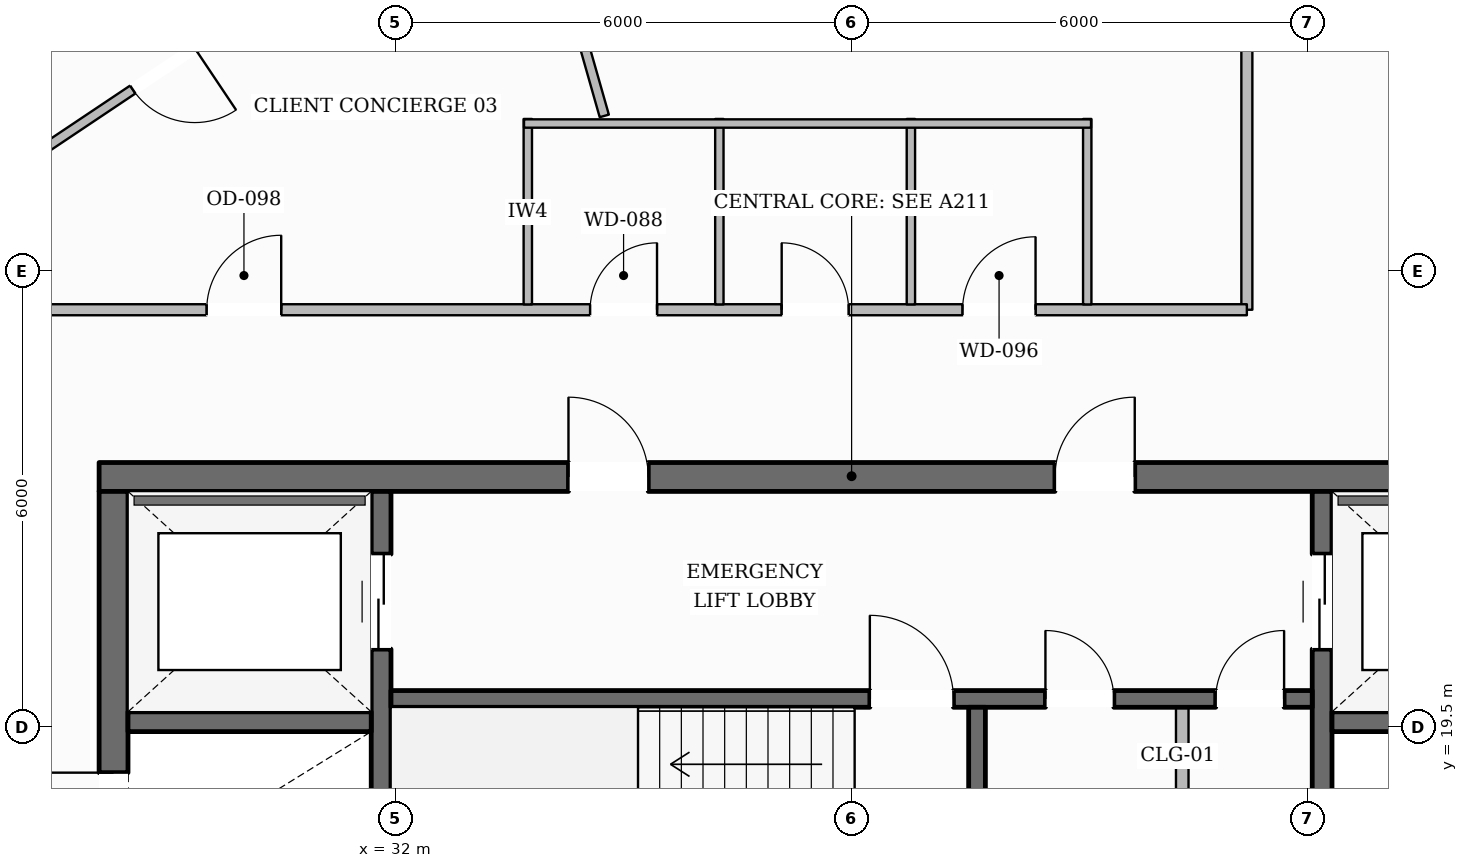
"""IFC4 building model, lengths in metres.
Left out: names, types, materials, properties, quantities, classifications, styles, units other than length and angle.
Written with IfcOpenShell. Run it as: python <this file> out.ifc"""

import sys

from ifc_helpers import new_model, si_unit, direction, frame, frame_2d, origin, place, context, subcontext, project, spatial, rectangle, extrude, element, fill, save


model = new_model("IFC4")
c1 = context("Model", 3, precision=1e-05, world=origin(), true_north=direction((0.0, 1.0)))
c2 = subcontext(c1, "Body", "Model", "MODEL_VIEW")
j1 = project(units=[si_unit("LENGTHUNIT", "METRE"), si_unit("PLANEANGLEUNIT", "RADIAN")], contexts=[c1])
p1 = place(None, origin())
s1 = spatial("IfcSite", under=j1, at=p1, CompositionType="ELEMENT")
p2 = place(p1, origin())
s2 = spatial("IfcBuilding", under=s1, at=p2, CompositionType="ELEMENT")
p3 = place(p2, frame((0.0, 0.0, 262.6)))
s3 = spatial("IfcBuildingStorey", under=s2, at=p3, CompositionType="ELEMENT", Elevation=262.6)
p4 = place(p3, frame((28.1, 22.79, 0.0), z_axis=(0.0, 0.0, 1.0), x_axis=(1.0, 0.0, 0.0)))
e1 = element("IfcWall", 1, at=p4, inside=s3, PredefinedType="SOLIDWALL", context=c2, shape_type="SweptSolid", body=[
    extrude(rectangle(XDim=19.8, YDim=0.38, at=frame_2d((9.9, 0.0))), origin(), (0.0, 0.0, 1.0), 3.61),
])
p5 = place(p4, frame((6.175, 0.0, 0.0)))
e2 = element("IfcOpeningElement", 2, at=p5, cuts=e1, PredefinedType="OPENING", context=c2, shape_type="SweptSolid", body=[
    extrude(rectangle(XDim=1.05, YDim=2.15, at=frame_2d((0.525, 1.075))), frame((0.0, 0.2, 0.0), z_axis=(0.0, -1.0, 0.0), x_axis=(1.0, 0.0, 0.0)), (0.0, 0.0, 1.0), 0.4),
])
p6 = place(p4, frame((12.575, 0.0, 0.0)))
e3 = element("IfcOpeningElement", 3, at=p6, cuts=e1, PredefinedType="OPENING", context=c2, shape_type="SweptSolid", body=[
    extrude(rectangle(XDim=1.05, YDim=2.15, at=frame_2d((0.525, 1.075))), frame((0.0, 0.2, 0.0), z_axis=(0.0, -1.0, 0.0), x_axis=(1.0, 0.0, 0.0)), (0.0, 0.0, 1.0), 0.4),
])
p7 = place(p3, frame((28.29, 9.6, 0.0), z_axis=(0.0, 0.0, 1.0), x_axis=(0.0, 1.0, 0.0)))
e4 = element("IfcWall", 4, at=p7, inside=s3, PredefinedType="SOLIDWALL", context=c2, shape_type="SweptSolid", body=[
    extrude(rectangle(XDim=13.0, YDim=0.38, at=frame_2d((6.5, 0.0))), origin(), (0.0, 0.0, 1.0), 3.61),
])
p8 = place(p7, frame((0.2, 0.0, 0.0)))
e5 = element("IfcOpeningElement", 5, at=p8, cuts=e4, PredefinedType="OPENING", context=c2, shape_type="SweptSolid", body=[
    extrude(rectangle(XDim=1.1, YDim=2.15, at=frame_2d((0.55, 1.075))), frame((0.0, 0.2, 0.0), z_axis=(0.0, -1.0, 0.0), x_axis=(1.0, 0.0, 0.0)), (0.0, 0.0, 1.0), 0.4),
])
p9 = place(p7, frame((8.4, 0.0, 0.0)))
e6 = element("IfcOpeningElement", 6, at=p9, cuts=e4, PredefinedType="OPENING", context=c2, shape_type="SweptSolid", body=[
    extrude(rectangle(XDim=0.9, YDim=2.1, at=frame_2d((0.45, 1.05))), frame((0.0, 0.2, 0.0), z_axis=(0.0, -1.0, 0.0), x_axis=(1.0, 0.0, 0.0)), (0.0, 0.0, 1.0), 0.4),
])
p10 = place(p3, frame((31.81, 9.6, 0.0), z_axis=(0.0, 0.0, 1.0), x_axis=(0.0, 1.0, 0.0)))
e7 = element("IfcWall", 7, at=p10, inside=s3, PredefinedType="SHEAR", context=c2, shape_type="SweptSolid", body=[
    extrude(rectangle(XDim=13.0, YDim=0.26, at=frame_2d((6.5, 0.0))), origin(), (0.0, 0.0, 1.0), 3.61),
])
p11 = place(p10, frame((10.925, 0.0, 0.0)))
e8 = element("IfcOpeningElement", 8, at=p11, cuts=e7, PredefinedType="OPENING", context=c2, shape_type="SweptSolid", body=[
    extrude(rectangle(XDim=1.25, YDim=2.25, at=frame_2d((0.625, 1.125))), frame((0.0, 0.14, 0.0), z_axis=(0.0, -1.0, 0.0), x_axis=(1.0, 0.0, 0.0)), (0.0, 0.0, 1.0), 0.28),
])
p12 = place(p3, frame((44.19, 9.6, 0.0), z_axis=(0.0, 0.0, 1.0), x_axis=(0.0, 1.0, 0.0)))
e9 = element("IfcWall", 9, at=p12, inside=s3, PredefinedType="SHEAR", context=c2, shape_type="SweptSolid", body=[
    extrude(rectangle(XDim=13.0, YDim=0.26, at=frame_2d((6.5, 0.0))), origin(), (0.0, 0.0, 1.0), 3.61),
])
p13 = place(p12, frame((10.925, 0.0, 0.0)))
e10 = element("IfcOpeningElement", 10, at=p13, cuts=e9, PredefinedType="OPENING", context=c2, shape_type="SweptSolid", body=[
    extrude(rectangle(XDim=1.25, YDim=2.25, at=frame_2d((0.625, 1.125))), frame((0.0, 0.14, 0.0), z_axis=(0.0, -1.0, 0.0), x_axis=(1.0, 0.0, 0.0)), (0.0, 0.0, 1.0), 0.28),
])
for number, where, z_axis, x_axis in (
    (11, (28.48, 19.57, 0.0), (0.0, 0.0, 1.0), (1.0, 0.0, 0.0)),
    (12, (44.32, 19.57, 0.0), (0.0, 0.0, 1.0), (1.0, 0.0, 0.0)),
):
    element("IfcWall", number, at=place(p3, frame(where, z_axis=z_axis, x_axis=x_axis)), inside=s3, PredefinedType="SHEAR", context=c2, shape_type="SweptSolid", body=[
        extrude(rectangle(XDim=3.2, YDim=0.26, at=frame_2d((1.6, 0.0))), origin(), (0.0, 0.0, 1.0), 3.61),
    ])
p14 = place(p3, frame((31.94, 19.87, 0.0), z_axis=(0.0, 0.0, 1.0), x_axis=(1.0, 0.0, 0.0)))
e13 = element("IfcWall", 13, at=p14, inside=s3, PredefinedType="SOLIDWALL", context=c2, shape_type="SweptSolid", body=[
    extrude(rectangle(XDim=12.12, YDim=0.22, at=frame_2d((6.06, 0.0))), origin(), (0.0, 0.0, 1.0), 3.61),
])
p15 = place(p14, frame((6.3, 0.0, 0.0)))
e14 = element("IfcOpeningElement", 14, at=p15, cuts=e13, PredefinedType="OPENING", context=c2, shape_type="SweptSolid", body=[
    extrude(rectangle(XDim=1.1, YDim=2.15, at=frame_2d((0.55, 1.075))), frame((0.0, 0.12, 0.0), z_axis=(0.0, -1.0, 0.0), x_axis=(1.0, 0.0, 0.0)), (0.0, 0.0, 1.0), 0.24),
])
p16 = place(p14, frame((8.61, 0.0, 0.0)))
e15 = element("IfcOpeningElement", 15, at=p16, cuts=e13, PredefinedType="OPENING", context=c2, shape_type="SweptSolid", body=[
    extrude(rectangle(XDim=0.9, YDim=2.1, at=frame_2d((0.45, 1.05))), frame((0.0, 0.12, 0.0), z_axis=(0.0, -1.0, 0.0), x_axis=(1.0, 0.0, 0.0)), (0.0, 0.0, 1.0), 0.24),
])
p17 = place(p14, frame((10.85, 0.0, 0.0)))
e16 = element("IfcOpeningElement", 16, at=p17, cuts=e13, PredefinedType="OPENING", context=c2, shape_type="SweptSolid", body=[
    extrude(rectangle(XDim=0.9, YDim=2.1, at=frame_2d((0.45, 1.05))), frame((0.0, 0.12, 0.0), z_axis=(0.0, -1.0, 0.0), x_axis=(1.0, 0.0, 0.0)), (0.0, 0.0, 1.0), 0.24),
])
p18 = place(p3, frame((39.65, 16.56, 0.0), z_axis=(0.0, 0.0, 1.0), x_axis=(0.0, 1.0, 0.0)))
e17 = element("IfcWall", 17, at=p18, inside=s3, PredefinedType="SOLIDWALL", context=c2, shape_type="SweptSolid", body=[
    extrude(rectangle(XDim=3.2, YDim=0.22, at=frame_2d((1.6, 0.0))), origin(), (0.0, 0.0, 1.0), 3.61),
])
p19 = place(p3, frame((16.079, 10.951, 0.0), z_axis=(0.0, 0.0, 1.0), x_axis=(0.498709777088, 0.866769033963, 0.0)))
e18 = element("IfcWall", 18, at=p19, inside=s3, PredefinedType="STANDARD", context=c2, shape_type="SweptSolid", body=[
    extrude(rectangle(XDim=37.726, YDim=0.35, at=frame_2d((18.863, 0.0))), origin(), (0.0, 0.0, 1.0), 3.196),
])
p20 = place(p19, frame((9.031, 0.0, 0.0)))
e19 = element("IfcOpeningElement", 19, at=p20, cuts=e18, PredefinedType="OPENING", context=c2, shape_type="SweptSolid", body=[
    extrude(rectangle(XDim=1.0, YDim=2.2, at=frame_2d((0.5, 1.1))), frame((0.0, 0.185, 0.0), z_axis=(0.0, -1.0, 0.0), x_axis=(1.0, 0.0, 0.0)), (0.0, 0.0, 1.0), 0.37),
])
p21 = place(p19, frame((33.506, 0.0, 0.65)))
e20 = element("IfcOpeningElement", 20, at=p21, cuts=e18, PredefinedType="OPENING", context=c2, shape_type="SweptSolid", body=[
    extrude(rectangle(XDim=1.35, YDim=1.75, at=frame_2d((0.675, 0.875))), frame((0.0, 0.185, 0.0), z_axis=(0.0, -1.0, 0.0), x_axis=(1.0, 0.0, 0.0)), (0.0, 0.0, 1.0), 0.37),
])
p22 = place(p19, frame((27.379, 0.0, 0.65)))
e21 = element("IfcOpeningElement", 21, at=p22, cuts=e18, PredefinedType="OPENING", context=c2, shape_type="SweptSolid", body=[
    extrude(rectangle(XDim=1.35, YDim=1.75, at=frame_2d((0.675, 0.875))), frame((0.0, 0.185, 0.0), z_axis=(0.0, -1.0, 0.0), x_axis=(1.0, 0.0, 0.0)), (0.0, 0.0, 1.0), 0.37),
])
p23 = place(p19, frame((21.251, 0.0, 0.65)))
e22 = element("IfcOpeningElement", 22, at=p23, cuts=e18, PredefinedType="OPENING", context=c2, shape_type="SweptSolid", body=[
    extrude(rectangle(XDim=1.35, YDim=1.75, at=frame_2d((0.675, 0.875))), frame((0.0, 0.185, 0.0), z_axis=(0.0, -1.0, 0.0), x_axis=(1.0, 0.0, 0.0)), (0.0, 0.0, 1.0), 0.37),
])
p24 = place(p19, frame((2.868, 0.0, 0.65)))
e23 = element("IfcOpeningElement", 23, at=p24, cuts=e18, PredefinedType="OPENING", context=c2, shape_type="SweptSolid", body=[
    extrude(rectangle(XDim=1.35, YDim=1.75, at=frame_2d((0.675, 0.875))), frame((0.0, 0.185, 0.0), z_axis=(0.0, -1.0, 0.0), x_axis=(1.0, 0.0, 0.0)), (0.0, 0.0, 1.0), 0.37),
])
p25 = place(p3, frame((41.23, 43.577, 0.0), z_axis=(0.0, 0.0, 1.0), x_axis=(0.507689696002, -0.861540000565, 0.0)))
e24 = element("IfcWall", 24, at=p25, inside=s3, PredefinedType="STANDARD", context=c2, shape_type="SweptSolid", body=[
    extrude(rectangle(XDim=38.41, YDim=0.35, at=frame_2d((19.205, 0.0))), origin(), (0.0, 0.0, 1.0), 3.196),
])
p26 = place(p25, frame((34.134, 0.0, 0.65)))
e25 = element("IfcOpeningElement", 25, at=p26, cuts=e24, PredefinedType="OPENING", context=c2, shape_type="SweptSolid", body=[
    extrude(rectangle(XDim=1.35, YDim=1.75, at=frame_2d((0.675, 0.875))), frame((0.0, 0.185, 0.0), z_axis=(0.0, -1.0, 0.0), x_axis=(1.0, 0.0, 0.0)), (0.0, 0.0, 1.0), 0.37),
])
p27 = place(p25, frame((27.89, 0.0, 0.65)))
e26 = element("IfcOpeningElement", 26, at=p27, cuts=e24, PredefinedType="OPENING", context=c2, shape_type="SweptSolid", body=[
    extrude(rectangle(XDim=1.35, YDim=1.75, at=frame_2d((0.675, 0.875))), frame((0.0, 0.185, 0.0), z_axis=(0.0, -1.0, 0.0), x_axis=(1.0, 0.0, 0.0)), (0.0, 0.0, 1.0), 0.37),
])
p28 = place(p25, frame((21.647, 0.0, 0.65)))
e27 = element("IfcOpeningElement", 27, at=p28, cuts=e24, PredefinedType="OPENING", context=c2, shape_type="SweptSolid", body=[
    extrude(rectangle(XDim=1.35, YDim=1.75, at=frame_2d((0.675, 0.875))), frame((0.0, 0.185, 0.0), z_axis=(0.0, -1.0, 0.0), x_axis=(1.0, 0.0, 0.0)), (0.0, 0.0, 1.0), 0.37),
])
p29 = place(p25, frame((9.161, 0.0, 0.65)))
e28 = element("IfcOpeningElement", 28, at=p29, cuts=e24, PredefinedType="OPENING", context=c2, shape_type="SweptSolid", body=[
    extrude(rectangle(XDim=1.35, YDim=1.75, at=frame_2d((0.675, 0.875))), frame((0.0, 0.185, 0.0), z_axis=(0.0, -1.0, 0.0), x_axis=(1.0, 0.0, 0.0)), (0.0, 0.0, 1.0), 0.37),
])
p30 = place(p25, frame((2.917, 0.0, 0.65)))
e29 = element("IfcOpeningElement", 29, at=p30, cuts=e24, PredefinedType="OPENING", context=c2, shape_type="SweptSolid", body=[
    extrude(rectangle(XDim=1.35, YDim=1.75, at=frame_2d((0.675, 0.875))), frame((0.0, 0.185, 0.0), z_axis=(0.0, -1.0, 0.0), x_axis=(1.0, 0.0, 0.0)), (0.0, 0.0, 1.0), 0.37),
])
p31 = place(p3, frame((42.35, 16.56, 0.0), z_axis=(0.0, 0.0, 1.0), x_axis=(0.0, 1.0, 0.0)))
e30 = element("IfcWall", 30, at=p31, inside=s3, PredefinedType="PARTITIONING", context=c2, shape_type="SweptSolid", body=[
    extrude(rectangle(XDim=3.2, YDim=0.165, at=frame_2d((1.6, 0.0))), origin(), (0.0, 0.0, 1.0), 3.61),
])
p32 = place(p3, frame((43.2, 24.99, 0.0), z_axis=(0.0, 0.0, 1.0), x_axis=(0.0, 1.0, 0.0)))
e31 = element("IfcWall", 31, at=p32, inside=s3, PredefinedType="PARTITIONING", context=c2, shape_type="SweptSolid", body=[
    extrude(rectangle(XDim=9.217, YDim=0.145, at=frame_2d((4.608, 0.0))), origin(), (0.0, 0.0, 1.0), 3.61),
])
p33 = place(p32, frame((3.908, 0.0, 0.0)))
e32 = element("IfcOpeningElement", 32, at=p33, cuts=e31, PredefinedType="OPENING", context=c2, shape_type="SweptSolid", body=[
    extrude(rectangle(XDim=1.4, YDim=2.2, at=frame_2d((0.7, 1.1))), frame((0.0, 0.083, 0.0), z_axis=(0.0, -1.0, 0.0), x_axis=(1.0, 0.0, 0.0)), (0.0, 0.0, 1.0), 0.165),
])
p34 = place(p3, frame((26.09, 24.99, 0.0), z_axis=(0.0, 0.0, 1.0), x_axis=(1.0, 0.0, 0.0)))
e33 = element("IfcWall", 33, at=p34, inside=s3, PredefinedType="PARTITIONING", context=c2, shape_type="SweptSolid", body=[
    extrude(rectangle(XDim=17.11, YDim=0.145, at=frame_2d((8.555, 0.0))), origin(), (0.0, 0.0, 1.0), 3.61),
])
p35 = place(p34, frame((8.47, 0.0, 0.0)))
e34 = element("IfcOpeningElement", 34, at=p35, cuts=e33, PredefinedType="OPENING", context=c2, shape_type="SweptSolid", body=[
    extrude(rectangle(XDim=0.88, YDim=2.1, at=frame_2d((0.44, 1.05))), frame((0.0, 0.083, 0.0), z_axis=(0.0, -1.0, 0.0), x_axis=(1.0, 0.0, 0.0)), (0.0, 0.0, 1.0), 0.165),
])
p36 = place(p34, frame((10.99, 0.0, 0.0)))
e35 = element("IfcOpeningElement", 35, at=p36, cuts=e33, PredefinedType="OPENING", context=c2, shape_type="SweptSolid", body=[
    extrude(rectangle(XDim=0.88, YDim=2.1, at=frame_2d((0.44, 1.05))), frame((0.0, 0.083, 0.0), z_axis=(0.0, -1.0, 0.0), x_axis=(1.0, 0.0, 0.0)), (0.0, 0.0, 1.0), 0.165),
])
p37 = place(p34, frame((13.37, 0.0, 0.0)))
e36 = element("IfcOpeningElement", 36, at=p37, cuts=e33, PredefinedType="OPENING", context=c2, shape_type="SweptSolid", body=[
    extrude(rectangle(XDim=0.96, YDim=2.1, at=frame_2d((0.48, 1.05))), frame((0.0, 0.083, 0.0), z_axis=(0.0, -1.0, 0.0), x_axis=(1.0, 0.0, 0.0)), (0.0, 0.0, 1.0), 0.165),
])
p38 = place(p34, frame((3.426, 0.0, 0.0)))
e37 = element("IfcOpeningElement", 37, at=p38, cuts=e33, PredefinedType="OPENING", context=c2, shape_type="SweptSolid", body=[
    extrude(rectangle(XDim=0.98, YDim=2.15, at=frame_2d((0.49, 1.075))), frame((0.0, 0.083, 0.0), z_axis=(0.0, -1.0, 0.0), x_axis=(1.0, 0.0, 0.0)), (0.0, 0.0, 1.0), 0.165),
])
for number, where, z_axis, x_axis in (
    (38, (33.74, 25.06, 0.0), (0.0, 0.0, 1.0), (0.0, 1.0, 0.0)),
    (39, (36.26, 25.06, 0.0), (0.0, 0.0, 1.0), (0.0, 1.0, 0.0)),
    (40, (38.78, 25.06, 0.0), (0.0, 0.0, 1.0), (0.0, 1.0, 0.0)),
):
    element("IfcWall", number, at=place(p3, frame(where, z_axis=z_axis, x_axis=x_axis)), inside=s3, PredefinedType="PLUMBINGWALL", context=c2, shape_type="SweptSolid", body=[
        extrude(rectangle(XDim=2.44, YDim=0.11, at=frame_2d((1.22, 0.0))), origin(), (0.0, 0.0, 1.0), 3.61),
    ])
p39 = place(p3, frame((41.1, 25.06, 0.0), z_axis=(0.0, 0.0, 1.0), x_axis=(0.0, 1.0, 0.0)))
e41 = element("IfcWall", 41, at=p39, inside=s3, PredefinedType="PLUMBINGWALL", context=c2, shape_type="SweptSolid", body=[
    extrude(rectangle(XDim=2.44, YDim=0.11, at=frame_2d((1.22, 0.0))), origin(), (0.0, 0.0, 1.0), 3.246),
])
p40 = place(p3, frame((33.69, 27.44, 0.0), z_axis=(0.0, 0.0, 1.0), x_axis=(1.0, 0.0, 0.0)))
e42 = element("IfcWall", 42, at=p40, inside=s3, PredefinedType="PLUMBINGWALL", context=c2, shape_type="SweptSolid", body=[
    extrude(rectangle(XDim=7.46, YDim=0.11, at=frame_2d((3.73, 0.0))), origin(), (0.0, 0.0, 1.0), 3.61),
])
p41 = place(p3, frame((34.746, 27.54, 0.0), z_axis=(0.0, 0.0, 1.0), x_axis=(-0.273575053809, 0.961850658852, 0.0)))
e43 = element("IfcWall", 43, at=p41, inside=s3, PredefinedType="PARTITIONING", context=c2, shape_type="SweptSolid", body=[
    extrude(rectangle(XDim=10.355, YDim=0.125, at=frame_2d((5.178, 0.0))), origin(), (0.0, 0.0, 1.0), 3.61),
])
p42 = place(p3, frame((33.658, 31.31, 0.0), z_axis=(0.0, 0.0, 1.0), x_axis=(-0.831131874476, -0.556075361106, 0.0)))
e44 = element("IfcWall", 44, at=p42, inside=s3, PredefinedType="PARTITIONING", context=c2, shape_type="SweptSolid", body=[
    extrude(rectangle(XDim=11.138, YDim=0.125, at=frame_2d((5.569, 0.0))), origin(), (0.0, 0.0, 1.0), 3.199),
])
p43 = place(p42, frame((5.175, 0.0, 0.0)))
e45 = element("IfcOpeningElement", 45, at=p43, cuts=e44, PredefinedType="OPENING", context=c2, shape_type="SweptSolid", body=[
    extrude(rectangle(XDim=0.98, YDim=2.15, at=frame_2d((0.49, 1.075))), frame((0.0, 0.073, 0.0), z_axis=(0.0, -1.0, 0.0), x_axis=(1.0, 0.0, 0.0)), (0.0, 0.0, 1.0), 0.145),
])
p44 = place(p15, origin())
e46 = element("IfcDoor", 46, at=p44, inside=s3, OperationType="SINGLE_SWING_LEFT", PredefinedType="DOOR", context=c2, shape_type="SweptSolid", body=[
    extrude(rectangle(XDim=1.1, YDim=2.15, at=frame_2d((0.55, 1.075))), frame((0.0, 0.025, 0.0), z_axis=(0.0, -1.0, 0.0), x_axis=(1.0, 0.0, 0.0)), (0.0, 0.0, 1.0), 0.05),
])
fill(e14, e46)
p45 = place(p9, origin())
e47 = element("IfcDoor", 47, at=p45, inside=s3, OperationType="SINGLE_SWING_RIGHT", PredefinedType="DOOR", context=c2, shape_type="SweptSolid", body=[
    extrude(rectangle(XDim=0.9, YDim=2.1, at=frame_2d((0.45, 1.05))), frame((0.0, 0.025, 0.0), z_axis=(0.0, -1.0, 0.0), x_axis=(1.0, 0.0, 0.0)), (0.0, 0.0, 1.0), 0.05),
])
fill(e6, e47)
p46 = place(p5, origin())
e48 = element("IfcDoor", 48, at=p46, inside=s3, OperationType="SINGLE_SWING_LEFT", PredefinedType="DOOR", context=c2, shape_type="SweptSolid", body=[
    extrude(rectangle(XDim=1.05, YDim=2.15, at=frame_2d((0.525, 1.075))), frame((0.0, 0.025, 0.0), z_axis=(0.0, -1.0, 0.0), x_axis=(1.0, 0.0, 0.0)), (0.0, 0.0, 1.0), 0.05),
])
fill(e2, e48)
p47 = place(p6, origin())
e49 = element("IfcDoor", 49, at=p47, inside=s3, OperationType="SINGLE_SWING_RIGHT", PredefinedType="DOOR", context=c2, shape_type="SweptSolid", body=[
    extrude(rectangle(XDim=1.05, YDim=2.15, at=frame_2d((0.525, 1.075))), frame((0.0, 0.025, 0.0), z_axis=(0.0, -1.0, 0.0), x_axis=(1.0, 0.0, 0.0)), (0.0, 0.0, 1.0), 0.05),
])
fill(e3, e49)
p48 = place(p11, origin())
e50 = element("IfcDoor", 50, at=p48, inside=s3, OperationType="DOUBLE_DOOR_SLIDING", PredefinedType="DOOR", context=c2, shape_type="SweptSolid", body=[
    extrude(rectangle(XDim=1.25, YDim=2.25, at=frame_2d((0.625, 1.125))), frame((0.0, 0.025, 0.0), z_axis=(0.0, -1.0, 0.0), x_axis=(1.0, 0.0, 0.0)), (0.0, 0.0, 1.0), 0.05),
])
fill(e8, e50)
p49 = place(p13, origin())
e51 = element("IfcDoor", 51, at=p49, inside=s3, OperationType="DOUBLE_DOOR_SLIDING", PredefinedType="DOOR", context=c2, shape_type="SweptSolid", body=[
    extrude(rectangle(XDim=1.25, YDim=2.25, at=frame_2d((0.625, 1.125))), frame((0.0, 0.025, 0.0), z_axis=(0.0, -1.0, 0.0), x_axis=(1.0, 0.0, 0.0)), (0.0, 0.0, 1.0), 0.05),
])
fill(e10, e51)
p50 = place(p16, origin())
e52 = element("IfcDoor", 52, at=p50, inside=s3, OperationType="SINGLE_SWING_LEFT", PredefinedType="DOOR", context=c2, shape_type="SweptSolid", body=[
    extrude(rectangle(XDim=0.9, YDim=2.1, at=frame_2d((0.45, 1.05))), frame((0.0, 0.025, 0.0), z_axis=(0.0, -1.0, 0.0), x_axis=(1.0, 0.0, 0.0)), (0.0, 0.0, 1.0), 0.05),
])
fill(e15, e52)
p51 = place(p17, origin())
e53 = element("IfcDoor", 53, at=p51, inside=s3, OperationType="SINGLE_SWING_RIGHT", PredefinedType="DOOR", context=c2, shape_type="SweptSolid", body=[
    extrude(rectangle(XDim=0.9, YDim=2.1, at=frame_2d((0.45, 1.05))), frame((0.0, 0.025, 0.0), z_axis=(0.0, -1.0, 0.0), x_axis=(1.0, 0.0, 0.0)), (0.0, 0.0, 1.0), 0.05),
])
fill(e16, e53)
p52 = place(p35, origin())
e54 = element("IfcDoor", 54, at=p52, inside=s3, OperationType="SINGLE_SWING_RIGHT", PredefinedType="DOOR", context=c2, shape_type="SweptSolid", body=[
    extrude(rectangle(XDim=0.88, YDim=2.1, at=frame_2d((0.44, 1.05))), frame((0.0, 0.025, 0.0), z_axis=(0.0, -1.0, 0.0), x_axis=(1.0, 0.0, 0.0)), (0.0, 0.0, 1.0), 0.05),
])
fill(e34, e54)
p53 = place(p36, origin())
e55 = element("IfcDoor", 55, at=p53, inside=s3, OperationType="SINGLE_SWING_LEFT", PredefinedType="DOOR", context=c2, shape_type="SweptSolid", body=[
    extrude(rectangle(XDim=0.88, YDim=2.1, at=frame_2d((0.44, 1.05))), frame((0.0, 0.025, 0.0), z_axis=(0.0, -1.0, 0.0), x_axis=(1.0, 0.0, 0.0)), (0.0, 0.0, 1.0), 0.05),
])
fill(e35, e55)
p54 = place(p37, origin())
e56 = element("IfcDoor", 56, at=p54, inside=s3, OperationType="SINGLE_SWING_RIGHT", PredefinedType="DOOR", context=c2, shape_type="SweptSolid", body=[
    extrude(rectangle(XDim=0.96, YDim=2.1, at=frame_2d((0.48, 1.05))), frame((0.0, 0.025, 0.0), z_axis=(0.0, -1.0, 0.0), x_axis=(1.0, 0.0, 0.0)), (0.0, 0.0, 1.0), 0.05),
])
fill(e36, e56)
p55 = place(p38, origin())
e57 = element("IfcDoor", 57, at=p55, inside=s3, OperationType="SINGLE_SWING_RIGHT", PredefinedType="DOOR", context=c2, shape_type="SweptSolid", body=[
    extrude(rectangle(XDim=0.98, YDim=2.15, at=frame_2d((0.49, 1.075))), frame((0.0, 0.025, 0.0), z_axis=(0.0, -1.0, 0.0), x_axis=(1.0, 0.0, 0.0)), (0.0, 0.0, 1.0), 0.05),
])
fill(e37, e57)
p56 = place(p43, origin())
e58 = element("IfcDoor", 58, at=p56, inside=s3, OperationType="SINGLE_SWING_LEFT", PredefinedType="DOOR", context=c2, shape_type="SweptSolid", body=[
    extrude(rectangle(XDim=0.98, YDim=2.15, at=frame_2d((0.49, 1.075))), frame((0.0, 0.025, 0.0), z_axis=(0.0, -1.0, 0.0), x_axis=(1.0, 0.0, 0.0)), (0.0, 0.0, 1.0), 0.05),
])
fill(e45, e58)
save(model, sys.argv[1])
